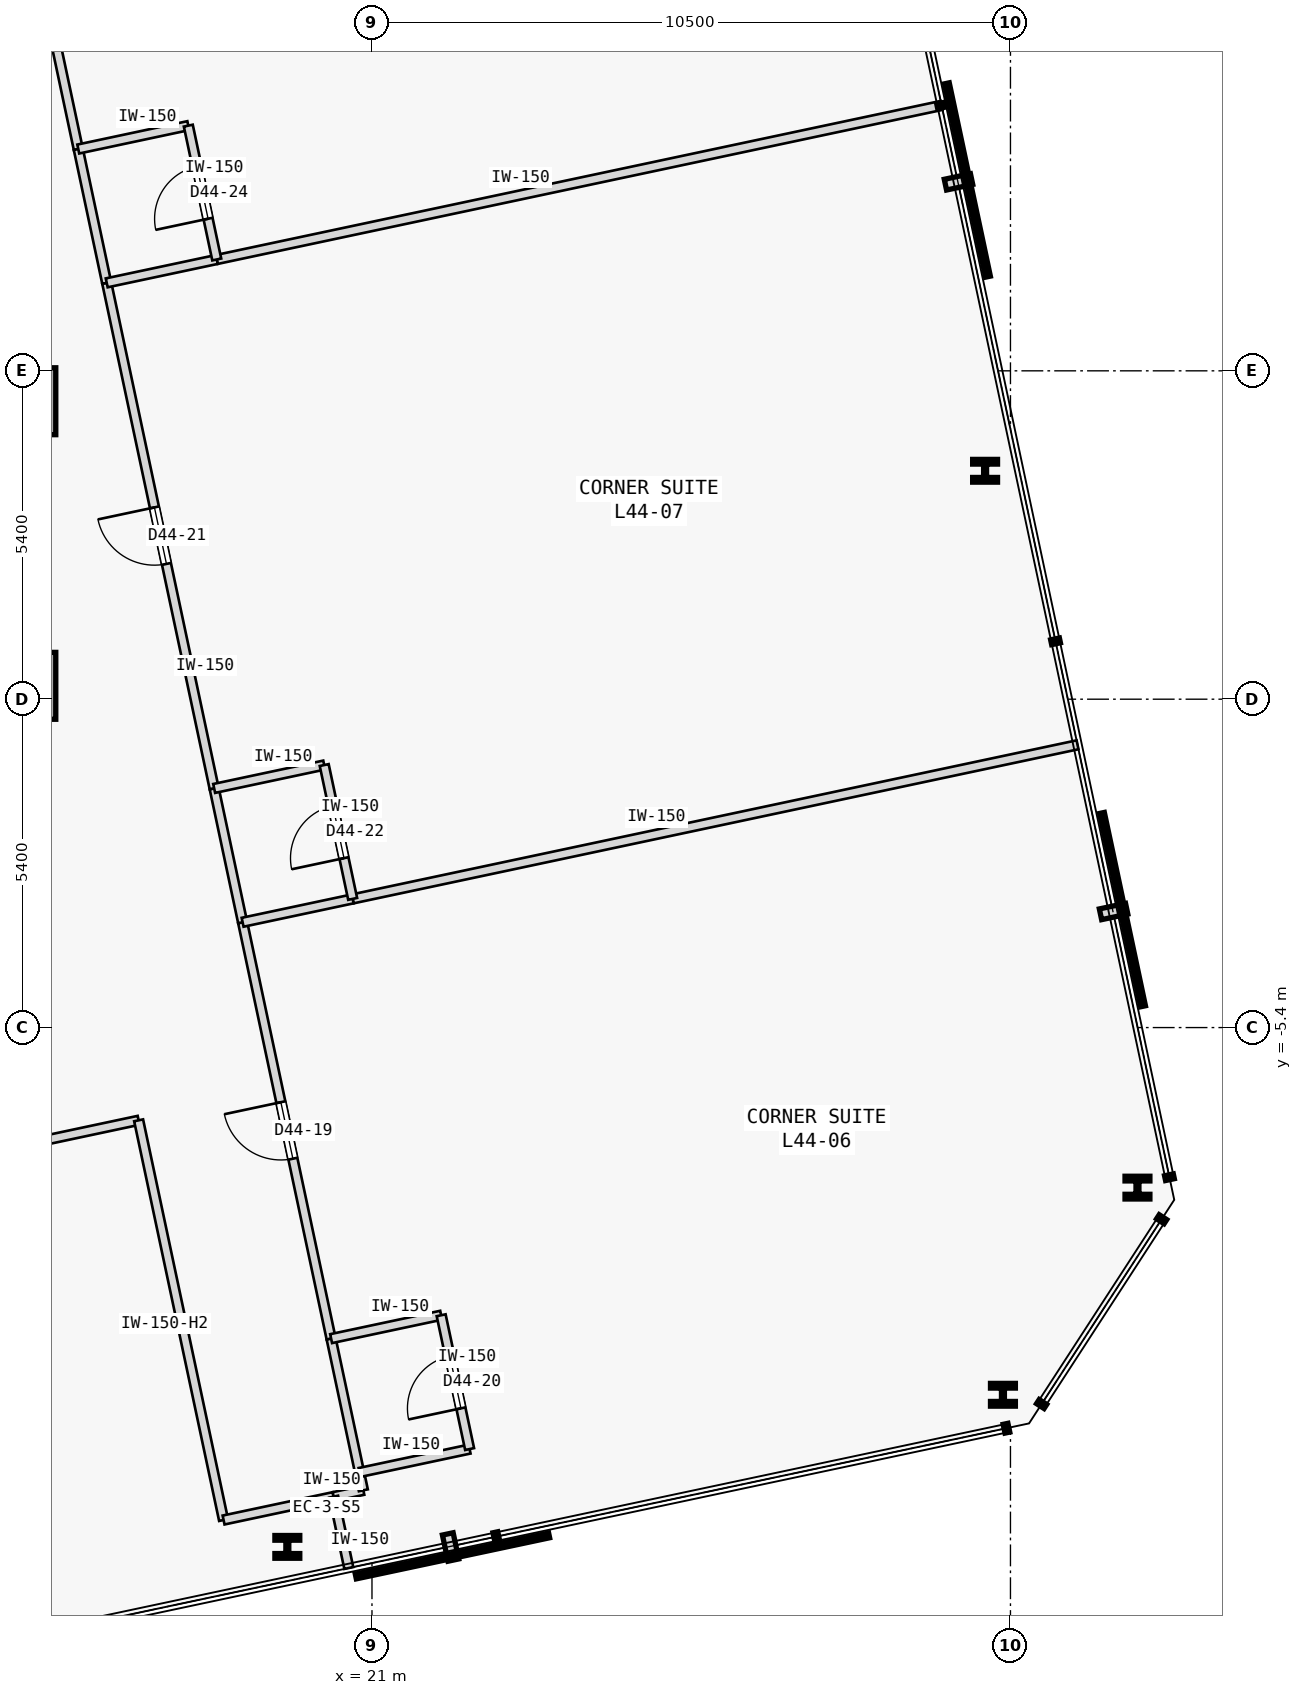
"""IFC4 building model, lengths in metres.
Left out: names, types, materials, properties, quantities, classifications, styles, units other than length and angle.
Written with IfcOpenShell. Run it as: python <this file> out.ifc"""

import sys

from ifc_helpers import new_model, si_unit, direction, frame, frame_2d, origin, origin_2d, place, context, subcontext, project, spatial, rectangle, i_section, extrude, element, fill, save


model = new_model("IFC4")
c1 = context("Model", 3, precision=1e-05, world=origin(), true_north=direction((0.0, 1.0)))
c2 = subcontext(c1, "Body", "Model", "MODEL_VIEW")
j1 = project(units=[si_unit("LENGTHUNIT", "METRE"), si_unit("PLANEANGLEUNIT", "RADIAN")], contexts=[c1])
p1 = place(None, origin())
s1 = spatial("IfcSite", under=j1, at=p1, CompositionType="ELEMENT")
p2 = place(p1, origin())
s2 = spatial("IfcBuilding", under=s1, at=p2, CompositionType="ELEMENT")
p3 = place(p2, frame((0.0, 0.0, 171.8)))
s3 = spatial("IfcBuildingStorey", under=s2, at=p3, CompositionType="ELEMENT", Elevation=171.8)
for number, where, z_axis, x_axis in (
    (1, (15.25, 4.9, 0.0), (0.0, 0.0, 1.0), (1.0, 0.0, 0.0)),
    (2, (15.25, 0.22, 0.0), (0.0, 0.0, 1.0), (1.0, 0.0, 0.0)),
):
    element("IfcColumn", number, at=place(p3, frame(where, z_axis=z_axis, x_axis=x_axis)), inside=s3, PredefinedType="COLUMN", context=c2, shape_type="SweptSolid", body=[
        extrude(rectangle(XDim=1.1, YDim=1.1, at=origin_2d()), origin(), (0.0, 0.0, 1.0), 3.4),
    ])
for number, where, z_axis, x_axis in (
    (3, (19.608, -13.94, 0.0), (0.0, 0.0, 1.0), (1.0, 0.0, 0.0)),
    (4, (31.376, -11.439, 0.0), (0.0, 0.0, 1.0), (1.0, 0.0, 0.0)),
    (5, (33.589, -8.032, 0.0), (0.0, 0.0, 1.0), (1.0, 0.0, 0.0)),
    (6, (31.083, 3.756, 0.0), (0.0, 0.0, 1.0), (1.0, 0.0, 0.0)),
):
    element("IfcColumn", number, at=place(p3, frame(where, z_axis=z_axis, x_axis=x_axis)), inside=s3, PredefinedType="COLUMN", context=c2, shape_type="SweptSolid", body=[
        extrude(i_section(OverallWidth=0.409, OverallDepth=0.374, WebThickness=0.048, FlangeThickness=0.077, FilletRadius=0.015, at=origin_2d()), origin(), (0.0, 0.0, 1.0), 3.4),
    ])
p4 = place(p3, frame((-12.862, -13.307, 0.0), z_axis=(0.0, 0.0, 1.0), x_axis=(0.97814793387, 0.207910123527, 0.0)))
e7 = element("IfcWall", 7, at=p4, inside=s3, PredefinedType="PARTITIONING", context=c2, shape_type="SweptSolid", body=[
    extrude(rectangle(XDim=30.695, YDim=0.15, at=frame_2d((15.348, 0.0))), origin(), (0.0, 0.0, 1.0), 3.175),
])
p5 = place(p4, frame((14.887, 0.0, 0.0)))
e8 = element("IfcOpeningElement", 8, at=p5, cuts=e7, PredefinedType="OPENING", context=c2, shape_type="SweptSolid", body=[
    extrude(rectangle(XDim=0.92, YDim=2.15, at=frame_2d((0.46, 1.075))), frame((0.0, 0.085, 0.0), z_axis=(0.0, -1.0, 0.0), x_axis=(1.0, 0.0, 0.0)), (0.0, 0.0, 1.0), 0.17),
])
p6 = place(p3, frame((18.56, -13.498, 0.0), z_axis=(0.0, 0.0, 1.0), x_axis=(-0.207888737749, 0.978152479278, 0.0)))
e9 = element("IfcWall", 9, at=p6, inside=s3, PredefinedType="PARTITIONING", context=c2, shape_type="SweptSolid", body=[
    extrude(rectangle(XDim=6.72, YDim=0.15, at=frame_2d((3.36, 0.0))), origin(), (0.0, 0.0, 1.0), 2.575),
])
p7 = place(p3, frame((18.56, -13.498, 0.0), z_axis=(0.0, 0.0, 1.0), x_axis=(0.978160192495, 0.207852442415, 0.0)))
e10 = element("IfcWall", 10, at=p7, inside=s3, PredefinedType="PARTITIONING", context=c2, shape_type="SweptSolid", body=[
    extrude(rectangle(XDim=1.85, YDim=0.15, at=frame_2d((0.925, 0.0))), origin(), (0.0, 0.0, 1.0), 3.175),
])
p8 = place(p3, frame((20.369, -13.114, 0.0), z_axis=(0.0, 0.0, 1.0), x_axis=(0.978143962546, 0.207928806409, 0.0)))
e11 = element("IfcWall", 11, at=p8, inside=s3, PredefinedType="PARTITIONING", context=c2, shape_type="SweptSolid", body=[
    extrude(rectangle(XDim=0.5, YDim=0.15, at=frame_2d((0.25, 0.0))), origin(), (0.0, 0.0, 1.0), 3.175),
])
p9 = place(p3, frame((20.858, -13.01, 0.0), z_axis=(0.0, 0.0, 1.0), x_axis=(-0.208306395052, 0.978063620518, 0.0)))
e12 = element("IfcWall", 12, at=p9, inside=s3, PredefinedType="PARTITIONING", context=c2, shape_type="SweptSolid", body=[
    extrude(rectangle(XDim=0.3, YDim=0.15, at=frame_2d((0.15, 0.0))), origin(), (0.0, 0.0, 1.0), 3.175),
])
p10 = place(p3, frame((20.328, -10.515, 0.0), z_axis=(0.0, 0.0, 1.0), x_axis=(-0.207906726269, 0.978148655968, 0.0)))
e13 = element("IfcWall", 13, at=p10, inside=s3, PredefinedType="PARTITIONING", context=c2, shape_type="SweptSolid", body=[
    extrude(rectangle(XDim=7.0, YDim=0.15, at=frame_2d((3.5, 0.0))), origin(), (0.0, 0.0, 1.0), 3.175),
])
p11 = place(p10, frame((3.025, 0.0, 0.0)))
e14 = element("IfcOpeningElement", 14, at=p11, cuts=e13, PredefinedType="OPENING", context=c2, shape_type="SweptSolid", body=[
    extrude(rectangle(XDim=0.95, YDim=2.15, at=frame_2d((0.475, 1.075))), frame((0.0, 0.085, 0.0), z_axis=(0.0, -1.0, 0.0), x_axis=(1.0, 0.0, 0.0)), (0.0, 0.0, 1.0), 0.17),
])
p12 = place(p3, frame((20.796, -12.716, 0.0), z_axis=(0.0, 0.0, 1.0), x_axis=(-0.207891197838, 0.978151956427, 0.0)))
e15 = element("IfcWall", 15, at=p12, inside=s3, PredefinedType="PARTITIONING", context=c2, shape_type="SweptSolid", body=[
    extrude(rectangle(XDim=2.25, YDim=0.15, at=frame_2d((1.125, 0.0))), origin(), (0.0, 0.0, 1.0), 3.175),
])
p13 = place(p3, frame((18.405, -1.468, 0.0), z_axis=(0.0, 0.0, 1.0), x_axis=(-0.207888984761, 0.97815242678, 0.0)))
e16 = element("IfcWall", 16, at=p13, inside=s3, PredefinedType="PARTITIONING", context=c2, shape_type="SweptSolid", body=[
    extrude(rectangle(XDim=8.5, YDim=0.15, at=frame_2d((4.25, 0.0))), origin(), (0.0, 0.0, 1.0), 3.175),
])
p14 = place(p13, frame((3.775, 0.0, 0.0)))
e17 = element("IfcOpeningElement", 17, at=p14, cuts=e16, PredefinedType="OPENING", context=c2, shape_type="SweptSolid", body=[
    extrude(rectangle(XDim=0.95, YDim=2.15, at=frame_2d((0.475, 1.075))), frame((0.0, 0.085, 0.0), z_axis=(0.0, -1.0, 0.0), x_axis=(1.0, 0.0, 0.0)), (0.0, 0.0, 1.0), 0.17),
])
p15 = place(p3, frame((18.873, -3.668, 0.0), z_axis=(0.0, 0.0, 1.0), x_axis=(-0.208017083936, 0.9781251928, 0.0)))
e18 = element("IfcWall", 18, at=p15, inside=s3, PredefinedType="PARTITIONING", context=c2, shape_type="SweptSolid", body=[
    extrude(rectangle(XDim=2.25, YDim=0.15, at=frame_2d((1.125, 0.0))), origin(), (0.0, 0.0, 1.0), 3.175),
])
p16 = place(p3, frame((16.17, 9.047, 0.0), z_axis=(0.0, 0.0, 1.0), x_axis=(-0.2079164651, 0.978146585917, 0.0)))
e19 = element("IfcWall", 19, at=p16, inside=s3, PredefinedType="PARTITIONING", context=c2, shape_type="SweptSolid", body=[
    extrude(rectangle(XDim=8.5, YDim=0.15, at=frame_2d((4.25, 0.0))), origin(), (0.0, 0.0, 1.0), 3.175),
])
p17 = place(p16, frame((3.775, 0.0, 0.0)))
e20 = element("IfcOpeningElement", 20, at=p17, cuts=e19, PredefinedType="OPENING", context=c2, shape_type="SweptSolid", body=[
    extrude(rectangle(XDim=0.95, YDim=2.15, at=frame_2d((0.475, 1.075))), frame((0.0, 0.085, 0.0), z_axis=(0.0, -1.0, 0.0), x_axis=(1.0, 0.0, 0.0)), (0.0, 0.0, 1.0), 0.17),
])
p18 = place(p3, frame((16.638, 6.847, 0.0), z_axis=(0.0, 0.0, 1.0), x_axis=(-0.207913264065, 0.978147266328, 0.0)))
e21 = element("IfcWall", 21, at=p18, inside=s3, PredefinedType="PARTITIONING", context=c2, shape_type="SweptSolid", body=[
    extrude(rectangle(XDim=2.25, YDim=0.15, at=frame_2d((1.125, 0.0))), origin(), (0.0, 0.0, 1.0), 3.175),
])
p19 = place(p3, frame((20.619, -14.288, 0.0), z_axis=(0.0, 0.0, 1.0), x_axis=(-0.207917150959, 0.978146440129, 0.0)))
e22 = element("IfcWall", 22, at=p19, inside=s3, PredefinedType="PARTITIONING", context=c2, shape_type="SweptSolid", body=[
    extrude(rectangle(XDim=1.2, YDim=0.15, at=frame_2d((0.6, 0.0))), origin(), (0.0, 0.0, 1.0), 3.175),
])
for number, where, z_axis, x_axis in (
    (23, (20.796, -12.716, 0.0), (0.0, 0.0, 1.0), (0.978, 0.208, 0.0)),
    (24, (20.328, -10.515, 0.0), (0.0, 0.0, 1.0), (0.978, 0.208, 0.0)),
):
    element("IfcWall", number, at=place(p3, frame(where, z_axis=z_axis, x_axis=x_axis)), inside=s3, PredefinedType="PARTITIONING", context=c2, shape_type="SweptSolid", body=[
        extrude(rectangle(XDim=1.85, YDim=0.15, at=frame_2d((0.925, 0.0))), origin(), (0.0, 0.0, 1.0), 3.175),
    ])
p20 = place(p3, frame((22.605, -12.332, 0.0), z_axis=(0.0, 0.0, 1.0), x_axis=(-0.207891197838, 0.978151956427, 0.0)))
e25 = element("IfcWall", 25, at=p20, inside=s3, PredefinedType="PARTITIONING", context=c2, shape_type="SweptSolid", body=[
    extrude(rectangle(XDim=2.25, YDim=0.15, at=frame_2d((1.125, 0.0))), origin(), (0.0, 0.0, 1.0), 3.175),
])
p21 = place(p20, frame((0.685, 0.0, 0.0)))
e26 = element("IfcOpeningElement", 26, at=p21, cuts=e25, PredefinedType="OPENING", context=c2, shape_type="SweptSolid", body=[
    extrude(rectangle(XDim=0.88, YDim=2.15, at=frame_2d((0.44, 1.075))), frame((0.0, 0.085, 0.0), z_axis=(0.0, -1.0, 0.0), x_axis=(1.0, 0.0, 0.0)), (0.0, 0.0, 1.0), 0.17),
])
p22 = place(p3, frame((20.682, -3.284, 0.0), z_axis=(0.0, 0.0, 1.0), x_axis=(0.97814556055, 0.207921288896, 0.0)))
e27 = element("IfcWall", 27, at=p22, inside=s3, PredefinedType="PARTITIONING", context=c2, shape_type="SweptSolid", body=[
    extrude(rectangle(XDim=12.187, YDim=0.15, at=frame_2d((6.094, 0.0))), origin(), (0.0, 0.0, 1.0), 3.175),
])
p23 = place(p3, frame((18.873, -3.668, 0.0), z_axis=(0.0, 0.0, 1.0), x_axis=(0.978160192495, 0.207852442415, 0.0)))
e28 = element("IfcWall", 28, at=p23, inside=s3, PredefinedType="PARTITIONING", context=c2, shape_type="SweptSolid", body=[
    extrude(rectangle(XDim=1.85, YDim=0.15, at=frame_2d((0.925, 0.0))), origin(), (0.0, 0.0, 1.0), 3.175),
])
p24 = place(p3, frame((18.405, -1.468, 0.0), z_axis=(0.0, 0.0, 1.0), x_axis=(0.978139061018, 0.207951862966, 0.0)))
e29 = element("IfcWall", 29, at=p24, inside=s3, PredefinedType="PARTITIONING", context=c2, shape_type="SweptSolid", body=[
    extrude(rectangle(XDim=1.85, YDim=0.15, at=frame_2d((0.925, 0.0))), origin(), (0.0, 0.0, 1.0), 3.175),
])
p25 = place(p3, frame((20.682, -3.284, 0.0), z_axis=(0.0, 0.0, 1.0), x_axis=(-0.207891197838, 0.978151956427, 0.0)))
e30 = element("IfcWall", 30, at=p25, inside=s3, PredefinedType="PARTITIONING", context=c2, shape_type="SweptSolid", body=[
    extrude(rectangle(XDim=2.25, YDim=0.15, at=frame_2d((1.125, 0.0))), origin(), (0.0, 0.0, 1.0), 3.175),
])
p26 = place(p25, frame((0.685, 0.0, 0.0)))
e31 = element("IfcOpeningElement", 31, at=p26, cuts=e30, PredefinedType="OPENING", context=c2, shape_type="SweptSolid", body=[
    extrude(rectangle(XDim=0.88, YDim=2.15, at=frame_2d((0.44, 1.075))), frame((0.0, 0.085, 0.0), z_axis=(0.0, -1.0, 0.0), x_axis=(1.0, 0.0, 0.0)), (0.0, 0.0, 1.0), 0.17),
])
p27 = place(p3, frame((18.447, 7.231, 0.0), z_axis=(0.0, 0.0, 1.0), x_axis=(0.978149634612, 0.207902121941, 0.0)))
e32 = element("IfcWall", 32, at=p27, inside=s3, PredefinedType="PARTITIONING", context=c2, shape_type="SweptSolid", body=[
    extrude(rectangle(XDim=12.187, YDim=0.15, at=frame_2d((6.094, 0.0))), origin(), (0.0, 0.0, 1.0), 3.175),
])
p28 = place(p3, frame((16.638, 6.847, 0.0), z_axis=(0.0, 0.0, 1.0), x_axis=(0.978160192495, 0.207852442415, 0.0)))
e33 = element("IfcWall", 33, at=p28, inside=s3, PredefinedType="PARTITIONING", context=c2, shape_type="SweptSolid", body=[
    extrude(rectangle(XDim=1.85, YDim=0.15, at=frame_2d((0.925, 0.0))), origin(), (0.0, 0.0, 1.0), 3.175),
])
p29 = place(p3, frame((16.17, 9.047, 0.0), z_axis=(0.0, 0.0, 1.0), x_axis=(0.978133353907, 0.20797870558, 0.0)))
e34 = element("IfcWall", 34, at=p29, inside=s3, PredefinedType="PARTITIONING", context=c2, shape_type="SweptSolid", body=[
    extrude(rectangle(XDim=1.85, YDim=0.15, at=frame_2d((0.925, 0.0))), origin(), (0.0, 0.0, 1.0), 3.175),
])
p30 = place(p3, frame((18.447, 7.231, 0.0), z_axis=(0.0, 0.0, 1.0), x_axis=(-0.207891197838, 0.978151956427, 0.0)))
e35 = element("IfcWall", 35, at=p30, inside=s3, PredefinedType="PARTITIONING", context=c2, shape_type="SweptSolid", body=[
    extrude(rectangle(XDim=2.25, YDim=0.15, at=frame_2d((1.125, 0.0))), origin(), (0.0, 0.0, 1.0), 3.175),
])
p31 = place(p30, frame((0.685, 0.0, 0.0)))
e36 = element("IfcOpeningElement", 36, at=p31, cuts=e35, PredefinedType="OPENING", context=c2, shape_type="SweptSolid", body=[
    extrude(rectangle(XDim=0.88, YDim=2.15, at=frame_2d((0.44, 1.075))), frame((0.0, 0.085, 0.0), z_axis=(0.0, -1.0, 0.0), x_axis=(1.0, 0.0, 0.0)), (0.0, 0.0, 1.0), 0.17),
])
p32 = place(p11, origin())
e37 = element("IfcDoor", 37, at=p32, inside=s3, OperationType="SINGLE_SWING_RIGHT", PredefinedType="DOOR", context=c2, shape_type="SweptSolid", body=[
    extrude(rectangle(XDim=0.95, YDim=2.15, at=frame_2d((0.475, 1.075))), frame((0.0, 0.025, 0.0), z_axis=(0.0, -1.0, 0.0), x_axis=(1.0, 0.0, 0.0)), (0.0, 0.0, 1.0), 0.05),
])
fill(e14, e37)
p33 = place(p21, origin())
e38 = element("IfcDoor", 38, at=p33, inside=s3, OperationType="SINGLE_SWING_LEFT", PredefinedType="DOOR", context=c2, shape_type="SweptSolid", body=[
    extrude(rectangle(XDim=0.88, YDim=2.15, at=frame_2d((0.44, 1.075))), frame((0.0, 0.025, 0.0), z_axis=(0.0, -1.0, 0.0), x_axis=(1.0, 0.0, 0.0)), (0.0, 0.0, 1.0), 0.05),
])
fill(e26, e38)
p34 = place(p14, origin())
e39 = element("IfcDoor", 39, at=p34, inside=s3, OperationType="SINGLE_SWING_RIGHT", PredefinedType="DOOR", context=c2, shape_type="SweptSolid", body=[
    extrude(rectangle(XDim=0.95, YDim=2.15, at=frame_2d((0.475, 1.075))), frame((0.0, 0.025, 0.0), z_axis=(0.0, -1.0, 0.0), x_axis=(1.0, 0.0, 0.0)), (0.0, 0.0, 1.0), 0.05),
])
fill(e17, e39)
p35 = place(p26, origin())
e40 = element("IfcDoor", 40, at=p35, inside=s3, OperationType="SINGLE_SWING_LEFT", PredefinedType="DOOR", context=c2, shape_type="SweptSolid", body=[
    extrude(rectangle(XDim=0.88, YDim=2.15, at=frame_2d((0.44, 1.075))), frame((0.0, 0.025, 0.0), z_axis=(0.0, -1.0, 0.0), x_axis=(1.0, 0.0, 0.0)), (0.0, 0.0, 1.0), 0.05),
])
fill(e31, e40)
p36 = place(p31, origin())
e41 = element("IfcDoor", 41, at=p36, inside=s3, OperationType="SINGLE_SWING_LEFT", PredefinedType="DOOR", context=c2, shape_type="SweptSolid", body=[
    extrude(rectangle(XDim=0.88, YDim=2.15, at=frame_2d((0.44, 1.075))), frame((0.0, 0.025, 0.0), z_axis=(0.0, -1.0, 0.0), x_axis=(1.0, 0.0, 0.0)), (0.0, 0.0, 1.0), 0.05),
])
fill(e36, e41)
save(model, sys.argv[1])
